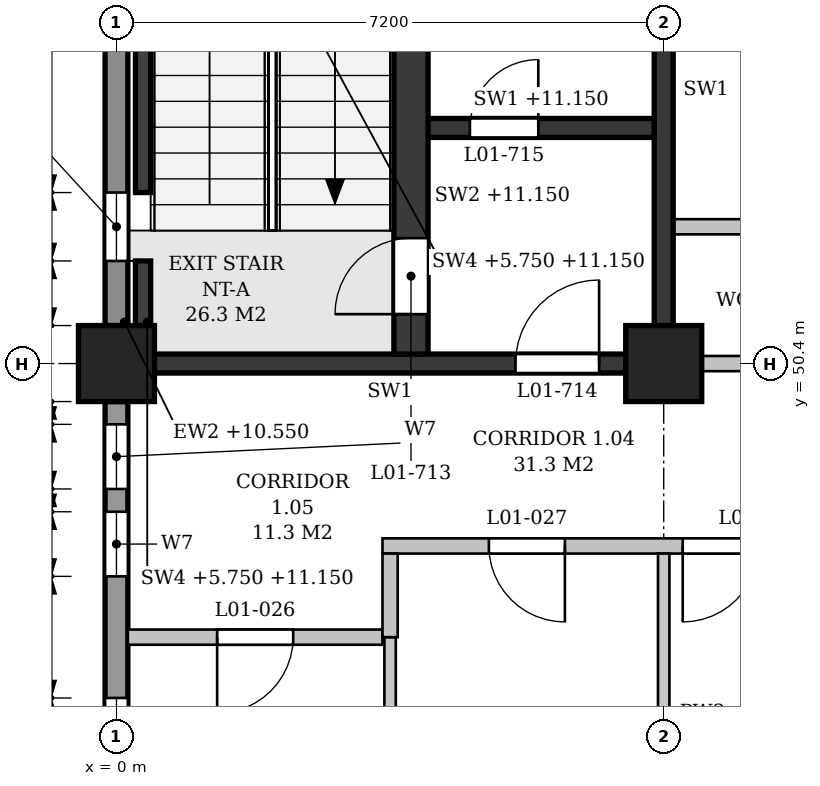
"""IFC4 building model, lengths in metres.
Left out: names, types, materials, properties, quantities, classifications, styles, units other than length and angle.
Written with IfcOpenShell. Run it as: python <this file> out.ifc"""

import sys

from ifc_helpers import new_model, si_unit, direction, frame, frame_2d, origin, origin_2d, place, context, subcontext, project, spatial, polyline, rectangle, outline, extrude, element, fill, save


model = new_model("IFC4")
c1 = context("Model", 3, precision=1e-05, world=origin(), true_north=direction((0.0, 1.0)))
c2 = subcontext(c1, "Body", "Model", "MODEL_VIEW")
j1 = project(units=[si_unit("LENGTHUNIT", "METRE"), si_unit("PLANEANGLEUNIT", "RADIAN")], contexts=[c1])
p1 = place(None, origin())
s1 = spatial("IfcSite", under=j1, at=p1, CompositionType="ELEMENT")
p2 = place(p1, origin())
s2 = spatial("IfcBuilding", under=s1, at=p2, CompositionType="ELEMENT")
p3 = place(p2, frame((0.0, 0.0, 6.0)))
s3 = spatial("IfcBuildingStorey", under=s2, at=p3, CompositionType="ELEMENT", Elevation=6.0)
for number, where, z_axis, x_axis in (
    (1, (0.0, 50.4, 0.0), (0.0, 0.0, 1.0), (1.0, 0.0, 0.0)),
    (2, (7.2, 50.4, 0.0), (0.0, 0.0, 1.0), (1.0, 0.0, 0.0)),
):
    element("IfcColumn", number, at=place(p3, frame(where, z_axis=z_axis, x_axis=x_axis)), inside=s3, PredefinedType="COLUMN", context=c2, shape_type="SweptSolid", body=[
        extrude(rectangle(XDim=1.0, YDim=1.0, at=origin_2d()), origin(), (0.0, 0.0, 1.0), 5.4),
    ])
p4 = place(p3, frame((0.0, 43.7, 0.0), z_axis=(0.0, 0.0, 1.0), x_axis=(0.0, 1.0, 0.0)))
e3 = element("IfcWall", 3, at=p4, inside=s3, PredefinedType="STANDARD", context=c2, shape_type="SweptSolid", body=[
    extrude(rectangle(XDim=6.2, YDim=0.3, at=frame_2d((3.1, 0.0))), origin(), (0.0, 0.0, 1.0), 4.55),
])
p5 = place(p4, frame((0.3, 0.0, 0.9)))
e4 = element("IfcOpeningElement", 4, at=p5, cuts=e3, PredefinedType="OPENING", context=c2, shape_type="SweptSolid", body=[
    extrude(outline(polyline([(0.0, 0.0), (0.85, 0.0), (0.85, 3.15), (0.425, 3.6), (0.0, 3.15), (0.0, 0.0)])), frame((0.0, 0.16, 0.0), z_axis=(0.0, -1.0, 0.0), x_axis=(1.0, 0.0, 0.0)), (0.0, 0.0, 1.0), 0.32),
])
p6 = place(p4, frame((1.45, 0.0, 0.9)))
e5 = element("IfcOpeningElement", 5, at=p6, cuts=e3, PredefinedType="OPENING", context=c2, shape_type="SweptSolid", body=[
    extrude(outline(polyline([(0.0, 0.0), (0.85, 0.0), (0.85, 3.15), (0.425, 3.6), (0.0, 3.15), (0.0, 0.0)])), frame((0.0, 0.16, 0.0), z_axis=(0.0, -1.0, 0.0), x_axis=(1.0, 0.0, 0.0)), (0.0, 0.0, 1.0), 0.32),
])
p7 = place(p4, frame((3.9, 0.0, 0.9)))
e6 = element("IfcOpeningElement", 6, at=p7, cuts=e3, PredefinedType="OPENING", context=c2, shape_type="SweptSolid", body=[
    extrude(outline(polyline([(0.0, 0.0), (0.85, 0.0), (0.85, 3.15), (0.425, 3.6), (0.0, 3.15), (0.0, 0.0)])), frame((0.0, 0.16, 0.0), z_axis=(0.0, -1.0, 0.0), x_axis=(1.0, 0.0, 0.0)), (0.0, 0.0, 1.0), 0.32),
])
p8 = place(p4, frame((5.05, 0.0, 0.9)))
e7 = element("IfcOpeningElement", 7, at=p8, cuts=e3, PredefinedType="OPENING", context=c2, shape_type="SweptSolid", body=[
    extrude(outline(polyline([(0.0, 0.0), (0.85, 0.0), (0.85, 3.15), (0.425, 3.6), (0.0, 3.15), (0.0, 0.0)])), frame((0.0, 0.16, 0.0), z_axis=(0.0, -1.0, 0.0), x_axis=(1.0, 0.0, 0.0)), (0.0, 0.0, 1.0), 0.32),
])
p9 = place(p3, frame((0.0, 50.9, 0.0), z_axis=(0.0, 0.0, 1.0), x_axis=(0.0, 1.0, 0.0)))
e8 = element("IfcWall", 8, at=p9, inside=s3, PredefinedType="STANDARD", context=c2, shape_type="SweptSolid", body=[
    extrude(rectangle(XDim=6.2, YDim=0.3, at=frame_2d((3.1, 0.0))), origin(), (0.0, 0.0, 1.0), 4.55),
])
p10 = place(p9, frame((0.85, 0.0, 0.9)))
e9 = element("IfcOpeningElement", 9, at=p10, cuts=e8, PredefinedType="OPENING", context=c2, shape_type="SweptSolid", body=[
    extrude(outline(polyline([(0.0, 0.0), (0.9, 0.0), (0.9, 3.15), (0.45, 3.6), (0.0, 3.15), (0.0, 0.0)])), frame((0.0, 0.16, 0.0), z_axis=(0.0, -1.0, 0.0), x_axis=(1.0, 0.0, 0.0)), (0.0, 0.0, 1.0), 0.32),
])
p11 = place(p9, frame((4.45, 0.0, 0.9)))
e10 = element("IfcOpeningElement", 10, at=p11, cuts=e8, PredefinedType="OPENING", context=c2, shape_type="SweptSolid", body=[
    extrude(outline(polyline([(0.0, 0.0), (0.9, 0.0), (0.9, 3.15), (0.45, 3.6), (0.0, 3.15), (0.0, 0.0)])), frame((0.0, 0.16, 0.0), z_axis=(0.0, -1.0, 0.0), x_axis=(1.0, 0.0, 0.0)), (0.0, 0.0, 1.0), 0.32),
])
p12 = place(p3, frame((0.5, 50.4, 0.0), z_axis=(0.0, 0.0, 1.0), x_axis=(1.0, 0.0, 0.0)))
e11 = element("IfcWall", 11, at=p12, inside=s3, PredefinedType="SHEAR", context=c2, shape_type="SweptSolid", body=[
    extrude(rectangle(XDim=6.2, YDim=0.25, at=frame_2d((3.1, 0.0))), origin(), (0.0, 0.0, 1.0), 4.4),
])
p13 = place(p12, frame((4.75, 0.0, 0.0)))
e12 = element("IfcOpeningElement", 12, at=p13, cuts=e11, PredefinedType="OPENING", context=c2, shape_type="SweptSolid", body=[
    extrude(rectangle(XDim=1.1, YDim=2.1, at=frame_2d((0.55, 1.05))), frame((0.0, 0.135, 0.0), z_axis=(0.0, -1.0, 0.0), x_axis=(1.0, 0.0, 0.0)), (0.0, 0.0, 1.0), 0.27),
])
p14 = place(p3, frame((7.2, 50.9, 0.0), z_axis=(0.0, 0.0, 1.0), x_axis=(0.0, 1.0, 0.0)))
e13 = element("IfcWall", 13, at=p14, inside=s3, PredefinedType="SHEAR", context=c2, shape_type="SweptSolid", body=[
    extrude(rectangle(XDim=6.2, YDim=0.25, at=frame_2d((3.1, 0.0))), origin(), (0.0, 0.0, 1.0), 4.4),
])
p15 = place(p3, frame((0.35, 50.9, -0.25), z_axis=(0.0, 0.0, 1.0), x_axis=(0.0, 1.0, 0.0)))
e14 = element("IfcWall", 14, at=p15, inside=s3, PredefinedType="SHEAR", context=c2, shape_type="SweptSolid", body=[
    extrude(rectangle(XDim=0.85, YDim=0.2, at=frame_2d((0.425, 0.0))), origin(), (0.0, 0.0, 1.0), 5.4),
])
p16 = place(p3, frame((0.35, 52.65, -0.25), z_axis=(0.0, 0.0, 1.0), x_axis=(0.0, 1.0, 0.0)))
e15 = element("IfcWall", 15, at=p16, inside=s3, PredefinedType="SHEAR", context=c2, shape_type="SweptSolid", body=[
    extrude(rectangle(XDim=2.7, YDim=0.2, at=frame_2d((1.35, 0.0))), origin(), (0.0, 0.0, 1.0), 5.4),
])
p17 = place(p3, frame((3.875, 50.525, 0.0), z_axis=(0.0, 0.0, 1.0), x_axis=(0.0, 1.0, 0.0)))
e16 = element("IfcWall", 16, at=p17, inside=s3, PredefinedType="SHEAR", context=c2, shape_type="SweptSolid", body=[
    extrude(rectangle(XDim=6.925, YDim=0.45, at=frame_2d((3.462, 0.0))), origin(), (0.0, 0.0, 1.0), 5.15),
])
p18 = place(p17, frame((0.525, 0.0, 0.0)))
e17 = element("IfcOpeningElement", 17, at=p18, cuts=e16, PredefinedType="OPENING", context=c2, shape_type="SweptSolid", body=[
    extrude(rectangle(XDim=1.0, YDim=2.1, at=frame_2d((0.5, 1.05))), frame((0.0, 0.235, 0.0), z_axis=(0.0, -1.0, 0.0), x_axis=(1.0, 0.0, 0.0)), (0.0, 0.0, 1.0), 0.47),
])
p19 = place(p3, frame((4.1, 53.5, 0.0), z_axis=(0.0, 0.0, 1.0), x_axis=(1.0, 0.0, 0.0)))
e18 = element("IfcWall", 18, at=p19, inside=s3, PredefinedType="SHEAR", context=c2, shape_type="SweptSolid", body=[
    extrude(rectangle(XDim=2.975, YDim=0.25, at=frame_2d((1.487, 0.0))), origin(), (0.0, 0.0, 1.0), 5.15),
])
p20 = place(p19, frame((0.55, 0.0, 0.0)))
e19 = element("IfcOpeningElement", 19, at=p20, cuts=e18, PredefinedType="OPENING", context=c2, shape_type="SweptSolid", body=[
    extrude(rectangle(XDim=0.9, YDim=2.1, at=frame_2d((0.45, 1.05))), frame((0.0, 0.135, 0.0), z_axis=(0.0, -1.0, 0.0), x_axis=(1.0, 0.0, 0.0)), (0.0, 0.0, 1.0), 0.27),
])
p21 = place(p3, frame((0.15, 46.8, 0.0), z_axis=(0.0, 0.0, 1.0), x_axis=(1.0, 0.0, 0.0)))
e20 = element("IfcWall", 20, at=p21, inside=s3, PredefinedType="PARTITIONING", context=c2, shape_type="SweptSolid", body=[
    extrude(outline(polyline([(0.0, 0.0), (3.35, 0.0), (3.35, 5.15), (0.1, 5.15), (0.1, 4.55), (0.0, 4.55), (0.0, 0.0)])), frame((0.0, 0.1, 0.0), z_axis=(0.0, -1.0, 0.0), x_axis=(1.0, 0.0, 0.0)), (0.0, 0.0, 1.0), 0.2),
])
p22 = place(p21, frame((1.175, 0.0, 0.0)))
e21 = element("IfcOpeningElement", 21, at=p22, cuts=e20, PredefinedType="OPENING", context=c2, shape_type="SweptSolid", body=[
    extrude(rectangle(XDim=1.0, YDim=2.1, at=frame_2d((0.5, 1.05))), frame((0.0, 0.11, 0.0), z_axis=(0.0, -1.0, 0.0), x_axis=(1.0, 0.0, 0.0)), (0.0, 0.0, 1.0), 0.22),
])
p23 = place(p3, frame((3.5, 48.0, 0.0), z_axis=(0.0, 0.0, 1.0), x_axis=(1.0, 0.0, 0.0)))
e22 = element("IfcWall", 22, at=p23, inside=s3, PredefinedType="PARTITIONING", context=c2, shape_type="SweptSolid", body=[
    extrude(outline(polyline([(0.0, 0.0), (14.6, 0.0), (14.6, 5.15), (11.15, 5.15), (11.15, 4.4), (10.65, 4.4), (10.65, 5.15), (3.95, 5.15), (3.95, 4.4), (3.45, 4.4), (3.45, 5.15), (0.0, 5.15), (0.0, 0.0)])), frame((0.0, 0.1, 0.0), z_axis=(0.0, -1.0, 0.0), x_axis=(1.0, 0.0, 0.0)), (0.0, 0.0, 1.0), 0.2),
])
p24 = place(p23, frame((1.4, 0.0, 0.0)))
e23 = element("IfcOpeningElement", 23, at=p24, cuts=e22, PredefinedType="OPENING", context=c2, shape_type="SweptSolid", body=[
    extrude(rectangle(XDim=1.0, YDim=2.1, at=frame_2d((0.5, 1.05))), frame((0.0, 0.11, 0.0), z_axis=(0.0, -1.0, 0.0), x_axis=(1.0, 0.0, 0.0)), (0.0, 0.0, 1.0), 0.22),
])
p25 = place(p23, frame((6.3, 0.0, 0.0)))
e24 = element("IfcOpeningElement", 24, at=p25, cuts=e22, PredefinedType="OPENING", context=c2, shape_type="SweptSolid", body=[
    extrude(rectangle(XDim=2.0, YDim=2.1, at=frame_2d((1.0, 1.05))), frame((0.0, 0.11, 0.0), z_axis=(0.0, -1.0, 0.0), x_axis=(1.0, 0.0, 0.0)), (0.0, 0.0, 1.0), 0.22),
])
p26 = place(p23, frame((3.95, 0.0, 0.0)))
e25 = element("IfcOpeningElement", 25, at=p26, cuts=e22, PredefinedType="OPENING", context=c2, shape_type="SweptSolid", body=[
    extrude(rectangle(XDim=2.0, YDim=2.1, at=frame_2d((1.0, 1.05))), frame((0.0, 0.11, 0.0), z_axis=(0.0, -1.0, 0.0), x_axis=(1.0, 0.0, 0.0)), (0.0, 0.0, 1.0), 0.22),
])
p27 = place(p3, frame((7.7, 50.4, 0.0), z_axis=(0.0, 0.0, 1.0), x_axis=(1.0, 0.0, 0.0)))
e26 = element("IfcWall", 26, at=p27, inside=s3, PredefinedType="PARTITIONING", context=c2, shape_type="SweptSolid", body=[
    extrude(rectangle(XDim=6.2, YDim=0.2, at=frame_2d((3.1, 0.0))), origin(), (0.0, 0.0, 1.0), 4.4),
])
p28 = place(p27, frame((2.6, 0.0, 0.0)))
e27 = element("IfcOpeningElement", 27, at=p28, cuts=e26, PredefinedType="OPENING", context=c2, shape_type="SweptSolid", body=[
    extrude(rectangle(XDim=1.0, YDim=2.1, at=frame_2d((0.5, 1.05))), frame((0.0, 0.11, 0.0), z_axis=(0.0, -1.0, 0.0), x_axis=(1.0, 0.0, 0.0)), (0.0, 0.0, 1.0), 0.22),
])
p29 = place(p3, frame((7.325, 52.2, 0.0), z_axis=(0.0, 0.0, 1.0), x_axis=(1.0, 0.0, 0.0)))
e28 = element("IfcWall", 28, at=p29, inside=s3, PredefinedType="PARTITIONING", context=c2, shape_type="SweptSolid", body=[
    extrude(outline(polyline([(0.0, 0.0), (14.15, 0.0), (14.15, 4.4), (14.025, 4.4), (14.025, 5.15), (7.325, 5.15), (7.325, 4.4), (6.825, 4.4), (6.825, 5.15), (0.125, 5.15), (0.125, 4.4), (0.0, 4.4), (0.0, 0.0)])), frame((0.0, 0.1, 0.0), z_axis=(0.0, -1.0, 0.0), x_axis=(1.0, 0.0, 0.0)), (0.0, 0.0, 1.0), 0.2),
])
p30 = place(p29, frame((1.238, 0.0, 0.0)))
e29 = element("IfcOpeningElement", 29, at=p30, cuts=e28, PredefinedType="OPENING", context=c2, shape_type="SweptSolid", body=[
    extrude(rectangle(XDim=1.0, YDim=2.1, at=frame_2d((0.5, 1.05))), frame((0.0, 0.11, 0.0), z_axis=(0.0, -1.0, 0.0), x_axis=(1.0, 0.0, 0.0)), (0.0, 0.0, 1.0), 0.22),
])
p31 = place(p29, frame((4.775, 0.0, 0.0)))
e30 = element("IfcOpeningElement", 30, at=p31, cuts=e28, PredefinedType="OPENING", context=c2, shape_type="SweptSolid", body=[
    extrude(rectangle(XDim=1.0, YDim=2.1, at=frame_2d((0.5, 1.05))), frame((0.0, 0.11, 0.0), z_axis=(0.0, -1.0, 0.0), x_axis=(1.0, 0.0, 0.0)), (0.0, 0.0, 1.0), 0.22),
])
p32 = place(p29, frame((8.375, 0.0, 0.0)))
e31 = element("IfcOpeningElement", 31, at=p32, cuts=e28, PredefinedType="OPENING", context=c2, shape_type="SweptSolid", body=[
    extrude(rectangle(XDim=1.0, YDim=2.1, at=frame_2d((0.5, 1.05))), frame((0.0, 0.11, 0.0), z_axis=(0.0, -1.0, 0.0), x_axis=(1.0, 0.0, 0.0)), (0.0, 0.0, 1.0), 0.22),
])
p33 = place(p29, frame((11.913, 0.0, 0.0)))
e32 = element("IfcOpeningElement", 32, at=p33, cuts=e28, PredefinedType="OPENING", context=c2, shape_type="SweptSolid", body=[
    extrude(rectangle(XDim=1.0, YDim=2.1, at=frame_2d((0.5, 1.05))), frame((0.0, 0.11, 0.0), z_axis=(0.0, -1.0, 0.0), x_axis=(1.0, 0.0, 0.0)), (0.0, 0.0, 1.0), 0.22),
])
p34 = place(p3, frame((3.6, 36.15, 0.0), z_axis=(0.0, 0.0, 1.0), x_axis=(0.0, 1.0, 0.0)))
e33 = element("IfcWall", 33, at=p34, inside=s3, PredefinedType="PARTITIONING", context=c2, shape_type="SweptSolid", body=[
    extrude(rectangle(XDim=10.65, YDim=0.15, at=frame_2d((5.325, 0.0))), origin(), (0.0, 0.0, 1.0), 4.4),
])
p35 = place(p3, frame((3.6, 46.8, 0.0), z_axis=(0.0, 0.0, 1.0), x_axis=(0.0, 1.0, 0.0)))
e34 = element("IfcWall", 34, at=p35, inside=s3, PredefinedType="PARTITIONING", context=c2, shape_type="SweptSolid", body=[
    extrude(rectangle(XDim=1.1, YDim=0.2, at=frame_2d((0.55, 0.0))), origin(), (0.0, 0.0, 1.0), 5.15),
])
p36 = place(p3, frame((7.2, 43.7, 0.0), z_axis=(0.0, 0.0, 1.0), x_axis=(0.0, 1.0, 0.0)))
e35 = element("IfcWall", 35, at=p36, inside=s3, PredefinedType="PARTITIONING", context=c2, shape_type="SweptSolid", body=[
    extrude(rectangle(XDim=4.2, YDim=0.15, at=frame_2d((2.1, 0.0))), origin(), (0.0, 0.0, 1.0), 4.4),
])
p37 = place(p6, origin())
e36 = element("IfcWindow", 36, at=p37, inside=s3, PartitioningType="SINGLE_PANEL", PredefinedType="WINDOW", context=c2, shape_type="SweptSolid", body=[
    extrude(outline(polyline([(0.0, 0.0), (0.85, 0.0), (0.85, 3.15), (0.425, 3.6), (0.0, 3.15), (0.0, 0.0)])), frame((0.0, 0.03, 0.0), z_axis=(0.0, -1.0, 0.0), x_axis=(1.0, 0.0, 0.0)), (0.0, 0.0, 1.0), 0.06),
])
fill(e5, e36)
p38 = place(p7, origin())
e37 = element("IfcWindow", 37, at=p38, inside=s3, PartitioningType="SINGLE_PANEL", PredefinedType="WINDOW", context=c2, shape_type="SweptSolid", body=[
    extrude(outline(polyline([(0.0, 0.0), (0.85, 0.0), (0.85, 3.15), (0.425, 3.6), (0.0, 3.15), (0.0, 0.0)])), frame((0.0, 0.03, 0.0), z_axis=(0.0, -1.0, 0.0), x_axis=(1.0, 0.0, 0.0)), (0.0, 0.0, 1.0), 0.06),
])
fill(e6, e37)
p39 = place(p8, origin())
e38 = element("IfcWindow", 38, at=p39, inside=s3, PartitioningType="SINGLE_PANEL", PredefinedType="WINDOW", context=c2, shape_type="SweptSolid", body=[
    extrude(outline(polyline([(0.0, 0.0), (0.85, 0.0), (0.85, 3.15), (0.425, 3.6), (0.0, 3.15), (0.0, 0.0)])), frame((0.0, 0.03, 0.0), z_axis=(0.0, -1.0, 0.0), x_axis=(1.0, 0.0, 0.0)), (0.0, 0.0, 1.0), 0.06),
])
fill(e7, e38)
p40 = place(p10, origin())
e39 = element("IfcWindow", 39, at=p40, inside=s3, PartitioningType="SINGLE_PANEL", PredefinedType="WINDOW", context=c2, shape_type="SweptSolid", body=[
    extrude(outline(polyline([(0.0, 0.0), (0.9, 0.0), (0.9, 3.15), (0.45, 3.6), (0.0, 3.15), (0.0, 0.0)])), frame((0.0, 0.03, 0.0), z_axis=(0.0, -1.0, 0.0), x_axis=(1.0, 0.0, 0.0)), (0.0, 0.0, 1.0), 0.06),
])
fill(e9, e39)
p41 = place(p18, origin())
e40 = element("IfcDoor", 40, at=p41, inside=s3, OperationType="SINGLE_SWING_LEFT", PredefinedType="DOOR", context=c2, shape_type="SweptSolid", body=[
    extrude(rectangle(XDim=1.0, YDim=2.1, at=frame_2d((0.5, 1.05))), frame((0.0, 0.025, 0.0), z_axis=(0.0, -1.0, 0.0), x_axis=(1.0, 0.0, 0.0)), (0.0, 0.0, 1.0), 0.05),
])
fill(e17, e40)
p42 = place(p13, origin())
e41 = element("IfcDoor", 41, at=p42, inside=s3, OperationType="SINGLE_SWING_RIGHT", PredefinedType="DOOR", context=c2, shape_type="SweptSolid", body=[
    extrude(rectangle(XDim=1.1, YDim=2.1, at=frame_2d((0.55, 1.05))), frame((0.0, 0.025, 0.0), z_axis=(0.0, -1.0, 0.0), x_axis=(1.0, 0.0, 0.0)), (0.0, 0.0, 1.0), 0.05),
])
fill(e12, e41)
p43 = place(p20, origin())
e42 = element("IfcDoor", 42, at=p43, inside=s3, OperationType="SINGLE_SWING_RIGHT", PredefinedType="DOOR", context=c2, shape_type="SweptSolid", body=[
    extrude(rectangle(XDim=0.9, YDim=2.1, at=frame_2d((0.45, 1.05))), frame((0.0, 0.025, 0.0), z_axis=(0.0, -1.0, 0.0), x_axis=(1.0, 0.0, 0.0)), (0.0, 0.0, 1.0), 0.05),
])
fill(e19, e42)
p44 = place(p22, frame((1.0, 0.0, 0.0), z_axis=(0.0, 0.0, 1.0), x_axis=(-1.0, 0.0, 0.0)))
e43 = element("IfcDoor", 43, at=p44, inside=s3, OperationType="SINGLE_SWING_RIGHT", PredefinedType="DOOR", context=c2, shape_type="SweptSolid", body=[
    extrude(rectangle(XDim=1.0, YDim=2.1, at=frame_2d((0.5, 1.05))), frame((0.0, 0.025, 0.0), z_axis=(0.0, -1.0, 0.0), x_axis=(1.0, 0.0, 0.0)), (0.0, 0.0, 1.0), 0.05),
])
fill(e21, e43)
p45 = place(p24, frame((1.0, 0.0, 0.0), z_axis=(0.0, 0.0, 1.0), x_axis=(-1.0, 0.0, 0.0)))
e44 = element("IfcDoor", 44, at=p45, inside=s3, OperationType="SINGLE_SWING_LEFT", PredefinedType="DOOR", context=c2, shape_type="SweptSolid", body=[
    extrude(rectangle(XDim=1.0, YDim=2.1, at=frame_2d((0.5, 1.05))), frame((0.0, 0.025, 0.0), z_axis=(0.0, -1.0, 0.0), x_axis=(1.0, 0.0, 0.0)), (0.0, 0.0, 1.0), 0.05),
])
fill(e23, e44)
p46 = place(p26, origin())
e45 = element("IfcDoor", 45, at=p46, inside=s3, OperationType="DOUBLE_DOOR_SINGLE_SWING", PredefinedType="DOOR", context=c2, shape_type="SweptSolid", body=[
    extrude(rectangle(XDim=2.0, YDim=2.1, at=frame_2d((1.0, 1.05))), frame((0.0, 0.025, 0.0), z_axis=(0.0, -1.0, 0.0), x_axis=(1.0, 0.0, 0.0)), (0.0, 0.0, 1.0), 0.05),
])
fill(e25, e45)
save(model, sys.argv[1])
